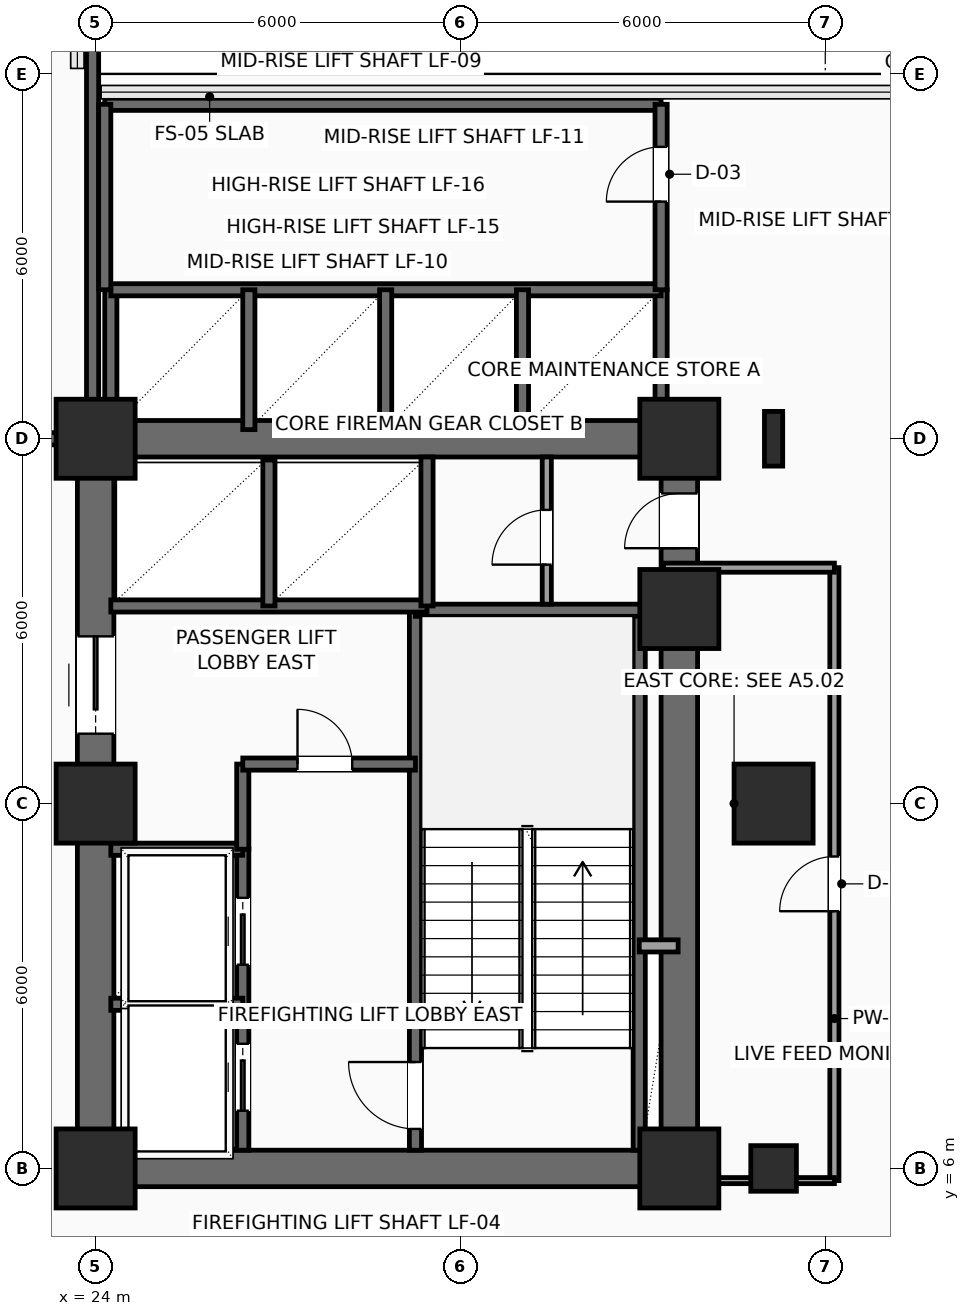
"""IFC4 building model, lengths in metres.
Left out: names, types, materials, properties, quantities, classifications, styles, units other than length and angle.
Written with IfcOpenShell. Run it as: python <this file> out.ifc"""

import sys

from ifc_helpers import new_model, si_unit, direction, frame, frame_2d, origin, origin_2d, place, context, subcontext, project, spatial, rectangle, hollow_rectangle, i_section, extrude, element, fill, save


model = new_model("IFC4")
c1 = context("Model", 3, precision=1e-05, world=origin(), true_north=direction((0.0, 1.0)))
c2 = subcontext(c1, "Body", "Model", "MODEL_VIEW")
j1 = project(units=[si_unit("LENGTHUNIT", "METRE"), si_unit("PLANEANGLEUNIT", "RADIAN")], contexts=[c1])
p1 = place(None, origin())
s1 = spatial("IfcSite", under=j1, at=p1, CompositionType="ELEMENT")
p2 = place(p1, origin())
s2 = spatial("IfcBuilding", under=s1, at=p2, CompositionType="ELEMENT")
p3 = place(p2, frame((0.0, 0.0, 36.3)))
s3 = spatial("IfcBuildingStorey", under=s2, at=p3, CompositionType="ELEMENT", Elevation=36.3)
for number, where, z_axis, x_axis in (
    (1, (24.0, 6.0, 0.0), (0.0, 0.0, 1.0), (1.0, 0.0, 0.0)),
    (2, (24.0, 12.0, 0.0), (0.0, 0.0, 1.0), (1.0, 0.0, 0.0)),
    (3, (24.0, 18.0, 0.0), (0.0, 0.0, 1.0), (1.0, 0.0, 0.0)),
    (4, (33.6, 6.0, 0.0), (0.0, 0.0, 1.0), (1.0, 0.0, 0.0)),
    (5, (33.6, 15.2, 0.0), (0.0, 0.0, 1.0), (1.0, 0.0, 0.0)),
    (6, (33.6, 18.0, 0.0), (0.0, 0.0, 1.0), (1.0, 0.0, 0.0)),
):
    element("IfcColumn", number, at=place(p3, frame(where, z_axis=z_axis, x_axis=x_axis)), inside=s3, PredefinedType="COLUMN", context=c2, shape_type="SweptSolid", body=[
        extrude(rectangle(XDim=1.3, YDim=1.3, at=origin_2d()), origin(), (0.0, 0.0, 1.0), 3.9),
    ])
p4 = place(p3, frame((35.15, 6.0, 0.0), z_axis=(0.0, 0.0, 1.0), x_axis=(1.0, 0.0, 0.0)))
e7 = element("IfcColumn", 7, at=p4, inside=s3, PredefinedType="COLUMN", context=c2, shape_type="SweptSolid", body=[
    extrude(hollow_rectangle(XDim=0.75, YDim=0.75, WallThickness=0.035, InnerFilletRadius=0.035, OuterFilletRadius=0.05, at=origin_2d()), origin(), (0.0, 0.0, 1.0), 3.9),
])
p5 = place(p3, frame((35.15, 12.0, 0.0), z_axis=(0.0, 0.0, 1.0), x_axis=(1.0, 0.0, 0.0)))
e8 = element("IfcColumn", 8, at=p5, inside=s3, PredefinedType="COLUMN", context=c2, shape_type="SweptSolid", body=[
    extrude(rectangle(XDim=1.3, YDim=1.3, at=origin_2d()), origin(), (0.0, 0.0, 1.0), 3.9),
])
p6 = place(p3, frame((35.15, 18.0, 0.0), z_axis=(0.0, 0.0, 1.0), x_axis=(1.0, 0.0, 0.0)))
e9 = element("IfcColumn", 9, at=p6, inside=s3, PredefinedType="COLUMN", context=c2, shape_type="SweptSolid", body=[
    extrude(i_section(OverallWidth=0.3, OverallDepth=0.9, WebThickness=0.019, FlangeThickness=0.035, FilletRadius=0.03, at=origin_2d()), origin(), (0.0, 0.0, 1.0), 3.9),
])
for number, where, z_axis, x_axis in (
    (10, (24.0, 6.0, 0.0), (0.0, 0.0, 1.0), (1.0, 0.0, 0.0)),
    (11, (24.0, 18.0, 0.0), (0.0, 0.0, 1.0), (1.0, 0.0, 0.0)),
):
    element("IfcWall", number, at=place(p3, frame(where, z_axis=z_axis, x_axis=x_axis)), inside=s3, PredefinedType="SHEAR", context=c2, shape_type="SweptSolid", body=[
        extrude(rectangle(XDim=9.6, YDim=0.6, at=frame_2d((4.8, 0.0))), origin(), (0.0, 0.0, 1.0), 3.65),
    ])
p7 = place(p3, frame((24.0, 6.0, 0.0), z_axis=(0.0, 0.0, 1.0), x_axis=(0.0, 1.0, 0.0)))
e12 = element("IfcWall", 12, at=p7, inside=s3, PredefinedType="SHEAR", context=c2, shape_type="SweptSolid", body=[
    extrude(rectangle(XDim=12.0, YDim=0.6, at=frame_2d((6.0, 0.0))), origin(), (0.0, 0.0, 1.0), 3.65),
])
p8 = place(p7, frame((7.15, 0.0, 0.0)))
e13 = element("IfcOpeningElement", 13, at=p8, cuts=e12, PredefinedType="OPENING", context=c2, shape_type="SweptSolid", body=[
    extrude(rectangle(XDim=1.6, YDim=2.3, at=frame_2d((0.8, 1.15))), frame((0.0, 0.31, 0.0), z_axis=(0.0, -1.0, 0.0), x_axis=(1.0, 0.0, 0.0)), (0.0, 0.0, 1.0), 0.62),
])
p9 = place(p3, frame((33.6, 6.0, 0.0), z_axis=(0.0, 0.0, 1.0), x_axis=(0.0, 1.0, 0.0)))
e14 = element("IfcWall", 14, at=p9, inside=s3, PredefinedType="SHEAR", context=c2, shape_type="SweptSolid", body=[
    extrude(rectangle(XDim=12.0, YDim=0.6, at=frame_2d((6.0, 0.0))), origin(), (0.0, 0.0, 1.0), 3.65),
])
p10 = place(p9, frame((10.2, 0.0, 0.0)))
e15 = element("IfcOpeningElement", 15, at=p10, cuts=e14, PredefinedType="OPENING", context=c2, shape_type="SweptSolid", body=[
    extrude(rectangle(XDim=0.9, YDim=2.15, at=frame_2d((0.45, 1.075))), frame((0.0, 0.31, 0.0), z_axis=(0.0, -1.0, 0.0), x_axis=(1.0, 0.0, 0.0)), (0.0, 0.0, 1.0), 0.62),
])
p11 = place(p3, frame((29.26, 6.3, 0.0), z_axis=(0.0, 0.0, 1.0), x_axis=(0.0, 1.0, 0.0)))
e16 = element("IfcWall", 16, at=p11, inside=s3, PredefinedType="SHEAR", context=c2, shape_type="SweptSolid", body=[
    extrude(rectangle(XDim=8.88, YDim=0.2, at=frame_2d((4.44, 0.0))), origin(), (0.0, 0.0, 1.0), 3.65),
])
p12 = place(p11, frame((0.35, 0.0, 0.0)))
e17 = element("IfcOpeningElement", 17, at=p12, cuts=e16, PredefinedType="OPENING", context=c2, shape_type="SweptSolid", body=[
    extrude(rectangle(XDim=1.1, YDim=2.2, at=frame_2d((0.55, 1.1))), frame((0.0, 0.11, 0.0), z_axis=(0.0, -1.0, 0.0), x_axis=(1.0, 0.0, 0.0)), (0.0, 0.0, 1.0), 0.22),
])
p13 = place(p3, frame((32.94, 6.3, 0.0), z_axis=(0.0, 0.0, 1.0), x_axis=(0.0, 1.0, 0.0)))
e18 = element("IfcWall", 18, at=p13, inside=s3, PredefinedType="SHEAR", context=c2, shape_type="SweptSolid", body=[
    extrude(rectangle(XDim=8.88, YDim=0.2, at=frame_2d((4.44, 0.0))), origin(), (0.0, 0.0, 1.0), 3.65),
])
p14 = place(p3, frame((29.26, 15.18, 0.0), z_axis=(0.0, 0.0, 1.0), x_axis=(1.0, 0.0, 0.0)))
e19 = element("IfcWall", 19, at=p14, inside=s3, PredefinedType="SHEAR", context=c2, shape_type="SweptSolid", body=[
    extrude(rectangle(XDim=4.04, YDim=0.2, at=frame_2d((2.02, 0.0))), origin(), (0.0, 0.0, 1.0), 3.65),
])
p15 = place(p3, frame((26.42, 6.3, 0.0), z_axis=(0.0, 0.0, 1.0), x_axis=(0.0, 1.0, 0.0)))
e20 = element("IfcWall", 20, at=p15, inside=s3, PredefinedType="SHEAR", context=c2, shape_type="SweptSolid", body=[
    extrude(rectangle(XDim=4.95, YDim=0.2, at=frame_2d((2.475, 0.0))), origin(), (0.0, 0.0, 1.0), 3.65),
])
p16 = place(p15, frame((0.65, 0.0, 0.0)))
e21 = element("IfcOpeningElement", 21, at=p16, cuts=e20, PredefinedType="OPENING", context=c2, shape_type="SweptSolid", body=[
    extrude(rectangle(XDim=1.1, YDim=2.2, at=frame_2d((0.55, 1.1))), frame((0.0, 0.11, 0.0), z_axis=(0.0, -1.0, 0.0), x_axis=(1.0, 0.0, 0.0)), (0.0, 0.0, 1.0), 0.22),
])
p17 = place(p15, frame((3.05, 0.0, 0.0)))
e22 = element("IfcOpeningElement", 22, at=p17, cuts=e20, PredefinedType="OPENING", context=c2, shape_type="SweptSolid", body=[
    extrude(rectangle(XDim=1.1, YDim=2.2, at=frame_2d((0.55, 1.1))), frame((0.0, 0.11, 0.0), z_axis=(0.0, -1.0, 0.0), x_axis=(1.0, 0.0, 0.0)), (0.0, 0.0, 1.0), 0.22),
])
for number, where, z_axis, x_axis in (
    (23, (24.25, 8.7, 0.0), (0.0, 0.0, 1.0), (1.0, 0.0, 0.0)),
    (24, (24.25, 11.25, 0.0), (0.0, 0.0, 1.0), (1.0, 0.0, 0.0)),
):
    element("IfcWall", number, at=place(p3, frame(where, z_axis=z_axis, x_axis=x_axis)), inside=s3, PredefinedType="SHEAR", context=c2, shape_type="SweptSolid", body=[
        extrude(rectangle(XDim=2.17, YDim=0.2, at=frame_2d((1.085, 0.0))), origin(), (0.0, 0.0, 1.0), 3.65),
    ])
p18 = place(p3, frame((26.42, 11.25, 0.0), z_axis=(0.0, 0.0, 1.0), x_axis=(0.0, 1.0, 0.0)))
e25 = element("IfcWall", 25, at=p18, inside=s3, PredefinedType="SHEAR", context=c2, shape_type="SweptSolid", body=[
    extrude(rectangle(XDim=1.4, YDim=0.2, at=frame_2d((0.7, 0.0))), origin(), (0.0, 0.0, 1.0), 3.65),
])
p19 = place(p3, frame((26.42, 12.65, 0.0), z_axis=(0.0, 0.0, 1.0), x_axis=(1.0, 0.0, 0.0)))
e26 = element("IfcWall", 26, at=p19, inside=s3, PredefinedType="SHEAR", context=c2, shape_type="SweptSolid", body=[
    extrude(rectangle(XDim=2.84, YDim=0.2, at=frame_2d((1.42, 0.0))), origin(), (0.0, 0.0, 1.0), 3.65),
])
p20 = place(p19, frame((0.9, 0.0, 0.0)))
e27 = element("IfcOpeningElement", 27, at=p20, cuts=e26, PredefinedType="OPENING", context=c2, shape_type="SweptSolid", body=[
    extrude(rectangle(XDim=0.9, YDim=2.15, at=frame_2d((0.45, 1.075))), frame((0.0, 0.11, 0.0), z_axis=(0.0, -1.0, 0.0), x_axis=(1.0, 0.0, 0.0)), (0.0, 0.0, 1.0), 0.22),
])
p21 = place(p3, frame((32.94, 9.66, 0.0), z_axis=(0.0, 0.0, 1.0), x_axis=(1.0, 0.0, 0.0)))
e28 = element("IfcWall", 28, at=p21, inside=s3, PredefinedType="SOLIDWALL", context=c2, shape_type="SweptSolid", body=[
    extrude(rectangle(XDim=0.64, YDim=0.2, at=frame_2d((0.32, 0.0))), origin(), (0.0, 0.0, 1.0), 3.65),
])
p22 = place(p3, frame((24.25, 15.25, 0.0), z_axis=(0.0, 0.0, 1.0), x_axis=(1.0, 0.0, 0.0)))
e29 = element("IfcWall", 29, at=p22, inside=s3, PredefinedType="SHEAR", context=c2, shape_type="SweptSolid", body=[
    extrude(rectangle(XDim=5.2, YDim=0.2, at=frame_2d((2.6, 0.0))), origin(), (0.0, 0.0, 1.0), 3.65),
])
p23 = place(p3, frame((26.85, 15.25, 0.0), z_axis=(0.0, 0.0, 1.0), x_axis=(0.0, 1.0, 0.0)))
e30 = element("IfcWall", 30, at=p23, inside=s3, PredefinedType="SHEAR", context=c2, shape_type="SweptSolid", body=[
    extrude(rectangle(XDim=2.4, YDim=0.2, at=frame_2d((1.2, 0.0))), origin(), (0.0, 0.0, 1.0), 3.65),
])
p24 = place(p3, frame((29.45, 15.25, 0.0), z_axis=(0.0, 0.0, 1.0), x_axis=(0.0, 1.0, 0.0)))
e31 = element("IfcWall", 31, at=p24, inside=s3, PredefinedType="SHEAR", context=c2, shape_type="SweptSolid", body=[
    extrude(rectangle(XDim=2.45, YDim=0.2, at=frame_2d((1.225, 0.0))), origin(), (0.0, 0.0, 1.0), 3.65),
])
p25 = place(p3, frame((31.42, 15.28, 0.0), z_axis=(0.0, 0.0, 1.0), x_axis=(0.0, 1.0, 0.0)))
e32 = element("IfcWall", 32, at=p25, inside=s3, PredefinedType="PARTITIONING", context=c2, shape_type="SweptSolid", body=[
    extrude(rectangle(XDim=2.42, YDim=0.15, at=frame_2d((1.21, 0.0))), origin(), (0.0, 0.0, 1.0), 3.65),
])
p26 = place(p25, frame((0.65, 0.0, 0.0)))
e33 = element("IfcOpeningElement", 33, at=p26, cuts=e32, PredefinedType="OPENING", context=c2, shape_type="SweptSolid", body=[
    extrude(rectangle(XDim=0.9, YDim=2.15, at=frame_2d((0.45, 1.075))), frame((0.0, 0.085, 0.0), z_axis=(0.0, -1.0, 0.0), x_axis=(1.0, 0.0, 0.0)), (0.0, 0.0, 1.0), 0.17),
])
p27 = place(p3, frame((20.45, 18.0, 0.0), z_axis=(0.0, 0.0, 1.0), x_axis=(1.0, 0.0, 0.0)))
e34 = element("IfcWall", 34, at=p27, inside=s3, PredefinedType="SHEAR", context=c2, shape_type="SweptSolid", body=[
    extrude(rectangle(XDim=3.5, YDim=0.2, at=frame_2d((1.75, 0.0))), origin(), (0.0, 0.0, 1.0), 3.65),
])
p28 = place(p27, frame((0.95, 0.0, 0.0)))
e35 = element("IfcOpeningElement", 35, at=p28, cuts=e34, PredefinedType="OPENING", context=c2, shape_type="SweptSolid", body=[
    extrude(rectangle(XDim=1.6, YDim=2.3, at=frame_2d((0.8, 1.15))), frame((0.0, 0.11, 0.0), z_axis=(0.0, -1.0, 0.0), x_axis=(1.0, 0.0, 0.0)), (0.0, 0.0, 1.0), 0.22),
])
p29 = place(p3, frame((23.95, 18.0, 0.0), z_axis=(0.0, 0.0, 1.0), x_axis=(0.0, 1.0, 0.0)))
e36 = element("IfcWall", 36, at=p29, inside=s3, PredefinedType="SHEAR", context=c2, shape_type="SweptSolid", body=[
    extrude(rectangle(XDim=9.3, YDim=0.2, at=frame_2d((4.65, 0.0))), origin(), (0.0, 0.0, 1.0), 3.65),
])
for number, where, z_axis, x_axis in (
    (37, (33.3, 18.1, 0.0), (0.0, 0.0, 1.0), (0.0, 1.0, 0.0)),
    (38, (24.25, 18.1, 0.0), (0.0, 0.0, 1.0), (0.0, 1.0, 0.0)),
):
    element("IfcWall", number, at=place(p3, frame(where, z_axis=z_axis, x_axis=x_axis)), inside=s3, PredefinedType="SHEAR", context=c2, shape_type="SweptSolid", body=[
        extrude(rectangle(XDim=2.35, YDim=0.2, at=frame_2d((1.175, 0.0))), origin(), (0.0, 0.0, 1.0), 3.65),
    ])
p30 = place(p3, frame((24.25, 20.45, 0.0), z_axis=(0.0, 0.0, 1.0), x_axis=(1.0, 0.0, 0.0)))
e39 = element("IfcWall", 39, at=p30, inside=s3, PredefinedType="SHEAR", context=c2, shape_type="SweptSolid", body=[
    extrude(rectangle(XDim=9.05, YDim=0.2, at=frame_2d((4.525, 0.0))), origin(), (0.0, 0.0, 1.0), 3.65),
])
for number, where, z_axis, x_axis in (
    (40, (26.52, 18.15, 0.0), (0.0, 0.0, 1.0), (0.0, 1.0, 0.0)),
    (41, (28.77, 18.15, 0.0), (0.0, 0.0, 1.0), (0.0, 1.0, 0.0)),
    (42, (31.02, 18.15, 0.0), (0.0, 0.0, 1.0), (0.0, 1.0, 0.0)),
):
    element("IfcWall", number, at=place(p3, frame(where, z_axis=z_axis, x_axis=x_axis)), inside=s3, PredefinedType="SHEAR", context=c2, shape_type="SweptSolid", body=[
        extrude(rectangle(XDim=2.3, YDim=0.2, at=frame_2d((1.15, 0.0))), origin(), (0.0, 0.0, 1.0), 3.65),
    ])
p31 = place(p3, frame((24.15, 23.5, 0.0), z_axis=(0.0, 0.0, 1.0), x_axis=(1.0, 0.0, 0.0)))
e43 = element("IfcWall", 43, at=p31, inside=s3, PredefinedType="SHEAR", context=c2, shape_type="SweptSolid", body=[
    extrude(rectangle(XDim=9.15, YDim=0.2, at=frame_2d((4.575, 0.0))), origin(), (0.0, 0.0, 1.0), 3.65),
])
p32 = place(p3, frame((33.3, 20.45, 0.0), z_axis=(0.0, 0.0, 1.0), x_axis=(0.0, 1.0, 0.0)))
e44 = element("IfcWall", 44, at=p32, inside=s3, PredefinedType="SHEAR", context=c2, shape_type="SweptSolid", body=[
    extrude(rectangle(XDim=3.05, YDim=0.2, at=frame_2d((1.525, 0.0))), origin(), (0.0, 0.0, 1.0), 3.65),
])
p33 = place(p32, frame((1.45, 0.0, 0.0)))
e45 = element("IfcOpeningElement", 45, at=p33, cuts=e44, PredefinedType="OPENING", context=c2, shape_type="SweptSolid", body=[
    extrude(rectangle(XDim=0.9, YDim=2.15, at=frame_2d((0.45, 1.075))), frame((0.0, 0.11, 0.0), z_axis=(0.0, -1.0, 0.0), x_axis=(1.0, 0.0, 0.0)), (0.0, 0.0, 1.0), 0.22),
])
p34 = place(p3, frame((24.15, 20.45, 0.0), z_axis=(0.0, 0.0, 1.0), x_axis=(0.0, 1.0, 0.0)))
e46 = element("IfcWall", 46, at=p34, inside=s3, PredefinedType="SHEAR", context=c2, shape_type="SweptSolid", body=[
    extrude(rectangle(XDim=3.05, YDim=0.2, at=frame_2d((1.525, 0.0))), origin(), (0.0, 0.0, 1.0), 3.65),
])
p35 = place(p3, frame((36.15, 5.8, 0.0), z_axis=(0.0, 0.0, 1.0), x_axis=(0.0, 1.0, 0.0)))
e47 = element("IfcWall", 47, at=p35, inside=s3, PredefinedType="PARTITIONING", context=c2, shape_type="SweptSolid", body=[
    extrude(rectangle(XDim=10.08, YDim=0.15, at=frame_2d((5.04, 0.0))), origin(), (0.0, 0.0, 1.0), 3.65),
])
p36 = place(p35, frame((4.43, 0.0, 0.0)))
e48 = element("IfcOpeningElement", 48, at=p36, cuts=e47, PredefinedType="OPENING", context=c2, shape_type="SweptSolid", body=[
    extrude(rectangle(XDim=0.9, YDim=2.1, at=frame_2d((0.45, 1.05))), frame((0.0, 0.085, 0.0), z_axis=(0.0, -1.0, 0.0), x_axis=(1.0, 0.0, 0.0)), (0.0, 0.0, 1.0), 0.17),
])
p37 = place(p3, frame((36.15, 15.88, 0.0), z_axis=(0.0, 0.0, 1.0), x_axis=(-1.0, 0.0, 0.0)))
e49 = element("IfcWall", 49, at=p37, inside=s3, PredefinedType="PARTITIONING", context=c2, shape_type="SweptSolid", body=[
    extrude(rectangle(XDim=2.81, YDim=0.15, at=frame_2d((1.405, 0.0))), origin(), (0.0, 0.0, 1.0), 3.65),
])
p38 = place(p3, frame((33.65, 5.8, 0.0), z_axis=(0.0, 0.0, 1.0), x_axis=(1.0, 0.0, 0.0)))
e50 = element("IfcWall", 50, at=p38, inside=s3, PredefinedType="PARTITIONING", context=c2, shape_type="SweptSolid", body=[
    extrude(rectangle(XDim=2.5, YDim=0.1, at=frame_2d((1.25, 0.0))), origin(), (0.0, 0.0, 1.0), 2.992),
])
p39 = place(p8, origin())
e51 = element("IfcDoor", 51, at=p39, inside=s3, OperationType="DOUBLE_DOOR_SLIDING", PredefinedType="DOOR", context=c2, shape_type="SweptSolid", body=[
    extrude(rectangle(XDim=1.6, YDim=2.3, at=frame_2d((0.8, 1.15))), frame((0.0, 0.025, 0.0), z_axis=(0.0, -1.0, 0.0), x_axis=(1.0, 0.0, 0.0)), (0.0, 0.0, 1.0), 0.05),
])
fill(e13, e51)
p40 = place(p10, origin())
e52 = element("IfcDoor", 52, at=p40, inside=s3, OperationType="SINGLE_SWING_LEFT", PredefinedType="DOOR", context=c2, shape_type="SweptSolid", body=[
    extrude(rectangle(XDim=0.9, YDim=2.15, at=frame_2d((0.45, 1.075))), frame((0.0, 0.025, 0.0), z_axis=(0.0, -1.0, 0.0), x_axis=(1.0, 0.0, 0.0)), (0.0, 0.0, 1.0), 0.05),
])
fill(e15, e52)
p41 = place(p12, origin())
e53 = element("IfcDoor", 53, at=p41, inside=s3, OperationType="SINGLE_SWING_RIGHT", PredefinedType="DOOR", context=c2, shape_type="SweptSolid", body=[
    extrude(rectangle(XDim=1.1, YDim=2.2, at=frame_2d((0.55, 1.1))), frame((0.0, 0.025, 0.0), z_axis=(0.0, -1.0, 0.0), x_axis=(1.0, 0.0, 0.0)), (0.0, 0.0, 1.0), 0.05),
])
fill(e17, e53)
p42 = place(p16, origin())
e54 = element("IfcDoor", 54, at=p42, inside=s3, OperationType="SLIDING_TO_LEFT", PredefinedType="DOOR", context=c2, shape_type="SweptSolid", body=[
    extrude(rectangle(XDim=1.1, YDim=2.2, at=frame_2d((0.55, 1.1))), frame((0.0, 0.025, 0.0), z_axis=(0.0, -1.0, 0.0), x_axis=(1.0, 0.0, 0.0)), (0.0, 0.0, 1.0), 0.05),
])
fill(e21, e54)
p43 = place(p17, origin())
e55 = element("IfcDoor", 55, at=p43, inside=s3, OperationType="SLIDING_TO_LEFT", PredefinedType="DOOR", context=c2, shape_type="SweptSolid", body=[
    extrude(rectangle(XDim=1.1, YDim=2.2, at=frame_2d((0.55, 1.1))), frame((0.0, 0.025, 0.0), z_axis=(0.0, -1.0, 0.0), x_axis=(1.0, 0.0, 0.0)), (0.0, 0.0, 1.0), 0.05),
])
fill(e22, e55)
p44 = place(p20, origin())
e56 = element("IfcDoor", 56, at=p44, inside=s3, OperationType="SINGLE_SWING_LEFT", PredefinedType="DOOR", context=c2, shape_type="SweptSolid", body=[
    extrude(rectangle(XDim=0.9, YDim=2.15, at=frame_2d((0.45, 1.075))), frame((0.0, 0.025, 0.0), z_axis=(0.0, -1.0, 0.0), x_axis=(1.0, 0.0, 0.0)), (0.0, 0.0, 1.0), 0.05),
])
fill(e27, e56)
p45 = place(p26, origin())
e57 = element("IfcDoor", 57, at=p45, inside=s3, OperationType="SINGLE_SWING_LEFT", PredefinedType="DOOR", context=c2, shape_type="SweptSolid", body=[
    extrude(rectangle(XDim=0.9, YDim=2.15, at=frame_2d((0.45, 1.075))), frame((0.0, 0.025, 0.0), z_axis=(0.0, -1.0, 0.0), x_axis=(1.0, 0.0, 0.0)), (0.0, 0.0, 1.0), 0.05),
])
fill(e33, e57)
p46 = place(p33, origin())
e58 = element("IfcDoor", 58, at=p46, inside=s3, OperationType="SINGLE_SWING_LEFT", PredefinedType="DOOR", context=c2, shape_type="SweptSolid", body=[
    extrude(rectangle(XDim=0.9, YDim=2.15, at=frame_2d((0.45, 1.075))), frame((0.0, 0.025, 0.0), z_axis=(0.0, -1.0, 0.0), x_axis=(1.0, 0.0, 0.0)), (0.0, 0.0, 1.0), 0.05),
])
fill(e45, e58)
p47 = place(p36, origin())
e59 = element("IfcDoor", 59, at=p47, inside=s3, OperationType="SINGLE_SWING_LEFT", PredefinedType="DOOR", context=c2, shape_type="SweptSolid", body=[
    extrude(rectangle(XDim=0.9, YDim=2.1, at=frame_2d((0.45, 1.05))), frame((0.0, 0.025, 0.0), z_axis=(0.0, -1.0, 0.0), x_axis=(1.0, 0.0, 0.0)), (0.0, 0.0, 1.0), 0.05),
])
fill(e48, e59)
save(model, sys.argv[1])
